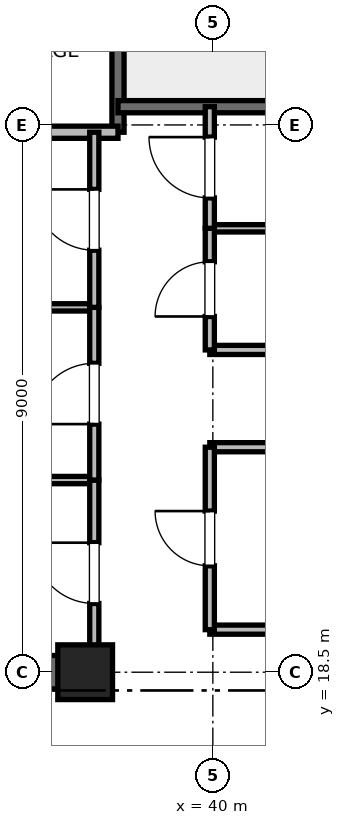
"""IFC4 building model, lengths in metres.
Left out: names, types, materials, properties, quantities, classifications, styles, units other than length and angle.
Written with IfcOpenShell. Run it as: python <this file> out.ifc"""

import sys

from ifc_helpers import new_model, si_unit, direction, frame, frame_2d, origin, origin_2d, place, context, subcontext, project, spatial, rectangle, extrude, element, fill, save


model = new_model("IFC4")
c1 = context("Model", 3, precision=1e-05, world=origin(), true_north=direction((0.0, 1.0)))
c2 = subcontext(c1, "Body", "Model", "MODEL_VIEW")
j1 = project(units=[si_unit("LENGTHUNIT", "METRE"), si_unit("PLANEANGLEUNIT", "RADIAN")], contexts=[c1])
p1 = place(None, origin())
s1 = spatial("IfcSite", under=j1, at=p1, CompositionType="ELEMENT")
p2 = place(p1, origin())
s2 = spatial("IfcBuilding", under=s1, at=p2, CompositionType="ELEMENT")
p3 = place(p2, frame((0.0, 0.0, 221.2)))
s3 = spatial("IfcBuildingStorey", under=s2, at=p3, CompositionType="ELEMENT", Elevation=221.2)
p4 = place(p3, frame((37.9, 18.5, 0.0), z_axis=(0.0, 0.0, 1.0), x_axis=(1.0, 0.0, 0.0)))
e1 = element("IfcColumn", 1, at=p4, inside=s3, PredefinedType="PILASTER", context=c2, shape_type="SweptSolid", body=[
    extrude(rectangle(XDim=0.9, YDim=0.9, at=origin_2d()), origin(), (0.0, 0.0, 1.0), 4.0),
])
p5 = place(p3, frame((29.0, 18.5, 0.0), z_axis=(0.0, 0.0, 1.0), x_axis=(1.0, 0.0, 0.0)))
e2 = element("IfcWall", 2, at=p5, inside=s3, PredefinedType="SHEAR", context=c2, shape_type="SweptSolid", body=[
    extrude(rectangle(XDim=9.2, YDim=0.55, at=frame_2d((4.6, 0.0))), origin(), (0.0, 0.0, 1.0), 3.775),
])
p6 = place(p3, frame((38.44, 27.38, 0.0), z_axis=(0.0, 0.0, 1.0), x_axis=(0.0, 1.0, 0.0)))
e3 = element("IfcWall", 3, at=p6, inside=s3, PredefinedType="SOLIDWALL", context=c2, shape_type="SweptSolid", body=[
    extrude(rectangle(XDim=8.87, YDim=0.2, at=frame_2d((4.435, 0.0))), origin(), (0.0, 0.0, 1.0), 3.775),
])
p7 = place(p3, frame((38.44, 27.8, 0.0), z_axis=(0.0, 0.0, 1.0), x_axis=(1.0, 0.0, 0.0)))
e4 = element("IfcWall", 4, at=p7, inside=s3, PredefinedType="SOLIDWALL", context=c2, shape_type="SweptSolid", body=[
    extrude(rectangle(XDim=3.32, YDim=0.2, at=frame_2d((1.66, 0.0))), origin(), (0.0, 0.0, 1.0), 3.775),
])
p8 = place(p3, frame((32.82, 27.38, 0.0), z_axis=(0.0, 0.0, 1.0), x_axis=(1.0, 0.0, 0.0)))
e5 = element("IfcWall", 5, at=p8, inside=s3, PredefinedType="PARTITIONING", context=c2, shape_type="SweptSolid", body=[
    extrude(rectangle(XDim=5.62, YDim=0.2, at=frame_2d((2.81, 0.0))), origin(), (0.0, 0.0, 1.0), 3.775),
])
for number, where, z_axis, x_axis in (
    (6, (39.95, 19.2, 0.0), (0.0, 0.0, 1.0), (1.0, 0.0, 0.0)),
    (7, (39.95, 22.2, 0.0), (0.0, 0.0, 1.0), (1.0, 0.0, 0.0)),
    (8, (39.95, 23.8, 0.0), (0.0, 0.0, 1.0), (1.0, 0.0, 0.0)),
):
    element("IfcWall", number, at=place(p3, frame(where, z_axis=z_axis, x_axis=x_axis)), inside=s3, PredefinedType="PARTITIONING", context=c2, shape_type="SweptSolid", body=[
        extrude(rectangle(XDim=1.81, YDim=0.15, at=frame_2d((0.905, 0.0))), origin(), (0.0, 0.0, 1.0), 2.85),
    ])
p9 = place(p3, frame((39.95, 25.8, 0.0), z_axis=(0.0, 0.0, 1.0), x_axis=(1.0, 0.0, 0.0)))
e9 = element("IfcWall", 9, at=p9, inside=s3, PredefinedType="PARTITIONING", context=c2, shape_type="SweptSolid", body=[
    extrude(rectangle(XDim=1.81, YDim=0.12, at=frame_2d((0.905, 0.0))), origin(), (0.0, 0.0, 1.0), 2.85),
])
p10 = place(p3, frame((39.95, 19.2, 0.0), z_axis=(0.0, 0.0, 1.0), x_axis=(0.0, 1.0, 0.0)))
e10 = element("IfcWall", 10, at=p10, inside=s3, PredefinedType="PARTITIONING", context=c2, shape_type="SweptSolid", body=[
    extrude(rectangle(XDim=3.0, YDim=0.15, at=frame_2d((1.5, 0.0))), origin(), (0.0, 0.0, 1.0), 2.85),
])
p11 = place(p10, frame((1.05, 0.0, 0.0)))
e11 = element("IfcOpeningElement", 11, at=p11, cuts=e10, PredefinedType="OPENING", context=c2, shape_type="SweptSolid", body=[
    extrude(rectangle(XDim=0.9, YDim=2.1, at=frame_2d((0.45, 1.05))), frame((0.0, 0.075, 0.0), z_axis=(0.0, -1.0, 0.0), x_axis=(1.0, 0.0, 0.0)), (0.0, 0.0, 1.0), 0.15),
])
p12 = place(p3, frame((39.95, 23.8, 0.0), z_axis=(0.0, 0.0, 1.0), x_axis=(0.0, 1.0, 0.0)))
e12 = element("IfcWall", 12, at=p12, inside=s3, PredefinedType="PARTITIONING", context=c2, shape_type="SweptSolid", body=[
    extrude(rectangle(XDim=2.0, YDim=0.15, at=frame_2d((1.0, 0.0))), origin(), (0.0, 0.0, 1.0), 2.85),
])
p13 = place(p12, frame((0.55, 0.0, 0.0)))
e13 = element("IfcOpeningElement", 13, at=p13, cuts=e12, PredefinedType="OPENING", context=c2, shape_type="SweptSolid", body=[
    extrude(rectangle(XDim=0.9, YDim=2.1, at=frame_2d((0.45, 1.05))), frame((0.0, 0.075, 0.0), z_axis=(0.0, -1.0, 0.0), x_axis=(1.0, 0.0, 0.0)), (0.0, 0.0, 1.0), 0.15),
])
p14 = place(p3, frame((39.95, 25.8, 0.0), z_axis=(0.0, 0.0, 1.0), x_axis=(0.0, 1.0, 0.0)))
e14 = element("IfcWall", 14, at=p14, inside=s3, PredefinedType="PARTITIONING", context=c2, shape_type="SweptSolid", body=[
    extrude(rectangle(XDim=2.0, YDim=0.15, at=frame_2d((1.0, 0.0))), origin(), (0.0, 0.0, 1.0), 2.85),
])
p15 = place(p14, frame((0.5, 0.0, 0.0)))
e15 = element("IfcOpeningElement", 15, at=p15, cuts=e14, PredefinedType="OPENING", context=c2, shape_type="SweptSolid", body=[
    extrude(rectangle(XDim=1.0, YDim=2.15, at=frame_2d((0.5, 1.075))), frame((0.0, 0.075, 0.0), z_axis=(0.0, -1.0, 0.0), x_axis=(1.0, 0.0, 0.0)), (0.0, 0.0, 1.0), 0.15),
])
for number, where, z_axis, x_axis in (
    (16, (32.82, 21.66, 0.0), (0.0, 0.0, 1.0), (1.0, 0.0, 0.0)),
    (17, (32.82, 24.5, 0.0), (0.0, 0.0, 1.0), (1.0, 0.0, 0.0)),
):
    element("IfcWall", number, at=place(p3, frame(where, z_axis=z_axis, x_axis=x_axis)), inside=s3, PredefinedType="PARTITIONING", context=c2, shape_type="SweptSolid", body=[
        extrude(rectangle(XDim=5.23, YDim=0.12, at=frame_2d((2.615, 0.0))), origin(), (0.0, 0.0, 1.0), 2.85),
    ])
p16 = place(p3, frame((38.05, 18.6, 0.0), z_axis=(0.0, 0.0, 1.0), x_axis=(0.0, 1.0, 0.0)))
e18 = element("IfcWall", 18, at=p16, inside=s3, PredefinedType="PARTITIONING", context=c2, shape_type="SweptSolid", body=[
    extrude(rectangle(XDim=3.06, YDim=0.15, at=frame_2d((1.53, 0.0))), origin(), (0.0, 0.0, 1.0), 2.755),
])
p17 = place(p16, frame((1.03, 0.0, 0.0)))
e19 = element("IfcOpeningElement", 19, at=p17, cuts=e18, PredefinedType="OPENING", context=c2, shape_type="SweptSolid", body=[
    extrude(rectangle(XDim=1.0, YDim=2.15, at=frame_2d((0.5, 1.075))), frame((0.0, 0.075, 0.0), z_axis=(0.0, -1.0, 0.0), x_axis=(1.0, 0.0, 0.0)), (0.0, 0.0, 1.0), 0.15),
])
p18 = place(p3, frame((38.05, 21.66, 0.0), z_axis=(0.0, 0.0, 1.0), x_axis=(0.0, 1.0, 0.0)))
e20 = element("IfcWall", 20, at=p18, inside=s3, PredefinedType="PARTITIONING", context=c2, shape_type="SweptSolid", body=[
    extrude(rectangle(XDim=2.84, YDim=0.15, at=frame_2d((1.42, 0.0))), origin(), (0.0, 0.0, 1.0), 2.85),
])
p19 = place(p18, frame((0.92, 0.0, 0.0)))
e21 = element("IfcOpeningElement", 21, at=p19, cuts=e20, PredefinedType="OPENING", context=c2, shape_type="SweptSolid", body=[
    extrude(rectangle(XDim=1.0, YDim=2.15, at=frame_2d((0.5, 1.075))), frame((0.0, 0.075, 0.0), z_axis=(0.0, -1.0, 0.0), x_axis=(1.0, 0.0, 0.0)), (0.0, 0.0, 1.0), 0.15),
])
p20 = place(p3, frame((38.05, 24.5, 0.0), z_axis=(0.0, 0.0, 1.0), x_axis=(0.0, 1.0, 0.0)))
e22 = element("IfcWall", 22, at=p20, inside=s3, PredefinedType="PARTITIONING", context=c2, shape_type="SweptSolid", body=[
    extrude(rectangle(XDim=2.88, YDim=0.15, at=frame_2d((1.44, 0.0))), origin(), (0.0, 0.0, 1.0), 2.85),
])
p21 = place(p20, frame((0.94, 0.0, 0.0)))
e23 = element("IfcOpeningElement", 23, at=p21, cuts=e22, PredefinedType="OPENING", context=c2, shape_type="SweptSolid", body=[
    extrude(rectangle(XDim=1.0, YDim=2.15, at=frame_2d((0.5, 1.075))), frame((0.0, 0.075, 0.0), z_axis=(0.0, -1.0, 0.0), x_axis=(1.0, 0.0, 0.0)), (0.0, 0.0, 1.0), 0.15),
])
p22 = place(p11, origin())
e24 = element("IfcDoor", 24, at=p22, inside=s3, OperationType="SINGLE_SWING_RIGHT", PredefinedType="DOOR", context=c2, shape_type="SweptSolid", body=[
    extrude(rectangle(XDim=0.9, YDim=2.1, at=frame_2d((0.45, 1.05))), frame((0.0, 0.025, 0.0), z_axis=(0.0, -1.0, 0.0), x_axis=(1.0, 0.0, 0.0)), (0.0, 0.0, 1.0), 0.05),
])
fill(e11, e24)
p23 = place(p13, origin())
e25 = element("IfcDoor", 25, at=p23, inside=s3, OperationType="SINGLE_SWING_LEFT", PredefinedType="DOOR", context=c2, shape_type="SweptSolid", body=[
    extrude(rectangle(XDim=0.9, YDim=2.1, at=frame_2d((0.45, 1.05))), frame((0.0, 0.025, 0.0), z_axis=(0.0, -1.0, 0.0), x_axis=(1.0, 0.0, 0.0)), (0.0, 0.0, 1.0), 0.05),
])
fill(e13, e25)
p24 = place(p15, origin())
e26 = element("IfcDoor", 26, at=p24, inside=s3, OperationType="SINGLE_SWING_RIGHT", PredefinedType="DOOR", context=c2, shape_type="SweptSolid", body=[
    extrude(rectangle(XDim=1.0, YDim=2.15, at=frame_2d((0.5, 1.075))), frame((0.0, 0.025, 0.0), z_axis=(0.0, -1.0, 0.0), x_axis=(1.0, 0.0, 0.0)), (0.0, 0.0, 1.0), 0.05),
])
fill(e15, e26)
p25 = place(p17, origin())
e27 = element("IfcDoor", 27, at=p25, inside=s3, OperationType="SINGLE_SWING_RIGHT", PredefinedType="DOOR", context=c2, shape_type="SweptSolid", body=[
    extrude(rectangle(XDim=1.0, YDim=2.15, at=frame_2d((0.5, 1.075))), frame((0.0, 0.025, 0.0), z_axis=(0.0, -1.0, 0.0), x_axis=(1.0, 0.0, 0.0)), (0.0, 0.0, 1.0), 0.05),
])
fill(e19, e27)
p26 = place(p19, origin())
e28 = element("IfcDoor", 28, at=p26, inside=s3, OperationType="SINGLE_SWING_LEFT", PredefinedType="DOOR", context=c2, shape_type="SweptSolid", body=[
    extrude(rectangle(XDim=1.0, YDim=2.15, at=frame_2d((0.5, 1.075))), frame((0.0, 0.025, 0.0), z_axis=(0.0, -1.0, 0.0), x_axis=(1.0, 0.0, 0.0)), (0.0, 0.0, 1.0), 0.05),
])
fill(e21, e28)
p27 = place(p21, origin())
e29 = element("IfcDoor", 29, at=p27, inside=s3, OperationType="SINGLE_SWING_RIGHT", PredefinedType="DOOR", context=c2, shape_type="SweptSolid", body=[
    extrude(rectangle(XDim=1.0, YDim=2.15, at=frame_2d((0.5, 1.075))), frame((0.0, 0.025, 0.0), z_axis=(0.0, -1.0, 0.0), x_axis=(1.0, 0.0, 0.0)), (0.0, 0.0, 1.0), 0.05),
])
fill(e23, e29)
save(model, sys.argv[1])
